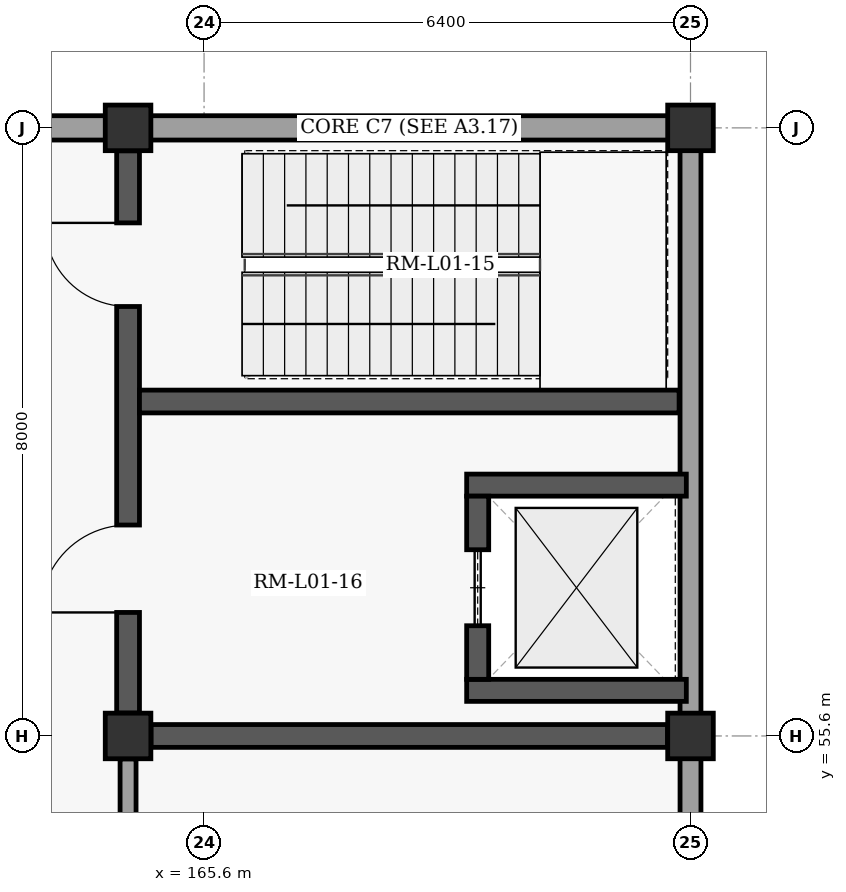
"""IFC4 building model, lengths in metres.
Left out: names, types, materials, properties, quantities, classifications, styles, units other than length and angle.
Written with IfcOpenShell. Run it as: python <this file> out.ifc"""

import sys

from ifc_helpers import new_model, si_unit, direction, frame, frame_2d, origin, origin_2d, place, context, subcontext, project, spatial, rectangle, extrude, element, fill, save


model = new_model("IFC4")
c1 = context("Model", 3, precision=1e-05, world=origin(), true_north=direction((0.0, 1.0)))
c2 = subcontext(c1, "Body", "Model", "MODEL_VIEW")
j1 = project(units=[si_unit("LENGTHUNIT", "METRE"), si_unit("PLANEANGLEUNIT", "RADIAN")], contexts=[c1])
p1 = place(None, origin())
s1 = spatial("IfcSite", under=j1, at=p1, CompositionType="ELEMENT")
p2 = place(p1, origin())
s2 = spatial("IfcBuilding", under=s1, at=p2, CompositionType="ELEMENT")
p3 = place(p2, frame((0.0, 0.0, 5.4)))
s3 = spatial("IfcBuildingStorey", under=s2, at=p3, CompositionType="ELEMENT", Elevation=5.4)
for number, where, z_axis, x_axis in (
    (1, (164.6, 55.6, 0.0), (0.0, 0.0, 1.0), (1.0, 0.0, 0.0)),
    (2, (164.6, 63.6, 0.0), (0.0, 0.0, 1.0), (1.0, 0.0, 0.0)),
    (3, (172.0, 55.6, 0.0), (0.0, 0.0, 1.0), (1.0, 0.0, 0.0)),
    (4, (172.0, 63.6, 0.0), (0.0, 0.0, 1.0), (1.0, 0.0, 0.0)),
):
    element("IfcColumn", number, at=place(p3, frame(where, z_axis=z_axis, x_axis=x_axis)), inside=s3, PredefinedType="COLUMN", context=c2, shape_type="SweptSolid", body=[
        extrude(rectangle(XDim=0.6, YDim=0.6, at=origin_2d()), origin(), (0.0, 0.0, 1.0), 4.8),
    ])
p4 = place(p3, frame((149.2, 63.6, 0.0), z_axis=(0.0, 0.0, 1.0), x_axis=(1.0, 0.0, 0.0)))
e5 = element("IfcWall", 5, at=p4, inside=s3, PredefinedType="SOLIDWALL", context=c2, shape_type="SweptSolid", body=[
    extrude(rectangle(XDim=22.8, YDim=0.32, at=frame_2d((11.4, 0.0))), origin(), (0.0, 0.0, 1.0), 3.67),
])
p5 = place(p4, frame((2.2, 0.0, 0.9)))
e6 = element("IfcOpeningElement", 6, at=p5, cuts=e5, PredefinedType="OPENING", context=c2, shape_type="SweptSolid", body=[
    extrude(rectangle(XDim=2.2, YDim=1.7, at=frame_2d((1.1, 0.85))), frame((0.0, 0.17, 0.0), z_axis=(0.0, -1.0, 0.0), x_axis=(1.0, 0.0, 0.0)), (0.0, 0.0, 1.0), 0.34),
])
p6 = place(p4, frame((7.6, 0.0, 0.0)))
e7 = element("IfcOpeningElement", 7, at=p6, cuts=e5, PredefinedType="OPENING", context=c2, shape_type="SweptSolid", body=[
    extrude(rectangle(XDim=1.4, YDim=2.25, at=frame_2d((0.7, 1.125))), frame((0.0, 0.17, 0.0), z_axis=(0.0, -1.0, 0.0), x_axis=(1.0, 0.0, 0.0)), (0.0, 0.0, 1.0), 0.34),
])
p7 = place(p3, frame((172.0, 63.6, 0.0), z_axis=(0.0, 0.0, 1.0), x_axis=(0.0, -1.0, 0.0)))
e8 = element("IfcWall", 8, at=p7, inside=s3, PredefinedType="SOLIDWALL", context=c2, shape_type="SweptSolid", body=[
    extrude(rectangle(XDim=56.0, YDim=0.275, at=frame_2d((28.0, 0.0))), origin(), (0.0, 0.0, 1.0), 3.67),
])
p8 = place(p7, frame((10.933, 0.0, 0.8)))
e9 = element("IfcOpeningElement", 9, at=p8, cuts=e8, PredefinedType="OPENING", context=c2, shape_type="SweptSolid", body=[
    extrude(rectangle(XDim=1.8, YDim=2.15, at=frame_2d((0.9, 1.075))), frame((0.0, 0.147, 0.0), z_axis=(0.0, -1.0, 0.0), x_axis=(1.0, 0.0, 0.0)), (0.0, 0.0, 1.0), 0.295),
])
p9 = place(p7, frame((19.667, 0.0, 0.8)))
e10 = element("IfcOpeningElement", 10, at=p9, cuts=e8, PredefinedType="OPENING", context=c2, shape_type="SweptSolid", body=[
    extrude(rectangle(XDim=1.9, YDim=2.2, at=frame_2d((0.95, 1.1))), frame((0.0, 0.147, 0.0), z_axis=(0.0, -1.0, 0.0), x_axis=(1.0, 0.0, 0.0)), (0.0, 0.0, 1.0), 0.295),
])
p10 = place(p7, frame((28.4, 0.0, 0.8)))
e11 = element("IfcOpeningElement", 11, at=p10, cuts=e8, PredefinedType="OPENING", context=c2, shape_type="SweptSolid", body=[
    extrude(rectangle(XDim=2.0, YDim=2.2, at=frame_2d((1.0, 1.1))), frame((0.0, 0.147, 0.0), z_axis=(0.0, -1.0, 0.0), x_axis=(1.0, 0.0, 0.0)), (0.0, 0.0, 1.0), 0.295),
])
p11 = place(p7, frame((37.133, 0.0, 0.8)))
e12 = element("IfcOpeningElement", 12, at=p11, cuts=e8, PredefinedType="OPENING", context=c2, shape_type="SweptSolid", body=[
    extrude(rectangle(XDim=2.1, YDim=2.2, at=frame_2d((1.05, 1.1))), frame((0.0, 0.147, 0.0), z_axis=(0.0, -1.0, 0.0), x_axis=(1.0, 0.0, 0.0)), (0.0, 0.0, 1.0), 0.295),
])
p12 = place(p7, frame((45.117, 0.0, 0.8)))
e13 = element("IfcOpeningElement", 13, at=p12, cuts=e8, PredefinedType="OPENING", context=c2, shape_type="SweptSolid", body=[
    extrude(rectangle(XDim=2.2, YDim=2.25, at=frame_2d((1.1, 1.125))), frame((0.0, 0.147, 0.0), z_axis=(0.0, -1.0, 0.0), x_axis=(1.0, 0.0, 0.0)), (0.0, 0.0, 1.0), 0.295),
])
p13 = place(p3, frame((164.902, 55.6, 0.0), z_axis=(0.0, 0.0, 1.0), x_axis=(1.0, 0.0, 0.0)))
e14 = element("IfcWall", 14, at=p13, inside=s3, PredefinedType="SHEAR", context=c2, shape_type="SweptSolid", body=[
    extrude(rectangle(XDim=6.796, YDim=0.3, at=frame_2d((3.398, 0.0))), origin(), (0.0, 0.0, 1.0), 4.52),
])
p14 = place(p3, frame((164.6, 55.902, 0.0), z_axis=(0.0, 0.0, 1.0), x_axis=(0.0, 1.0, 0.0)))
e15 = element("IfcWall", 15, at=p14, inside=s3, PredefinedType="SHEAR", context=c2, shape_type="SweptSolid", body=[
    extrude(rectangle(XDim=7.396, YDim=0.3, at=frame_2d((3.698, 0.0))), origin(), (0.0, 0.0, 1.0), 4.52),
])
p15 = place(p14, frame((5.348, 0.0, 0.0)))
e16 = element("IfcOpeningElement", 16, at=p15, cuts=e15, PredefinedType="OPENING", context=c2, shape_type="SweptSolid", body=[
    extrude(rectangle(XDim=1.1, YDim=2.15, at=frame_2d((0.55, 1.075))), frame((0.0, 0.16, 0.0), z_axis=(0.0, -1.0, 0.0), x_axis=(1.0, 0.0, 0.0)), (0.0, 0.0, 1.0), 0.32),
])
p16 = place(p14, frame((1.323, 0.0, 0.0)))
e17 = element("IfcOpeningElement", 17, at=p16, cuts=e15, PredefinedType="OPENING", context=c2, shape_type="SweptSolid", body=[
    extrude(rectangle(XDim=1.15, YDim=2.2, at=frame_2d((0.575, 1.1))), frame((0.0, 0.16, 0.0), z_axis=(0.0, -1.0, 0.0), x_axis=(1.0, 0.0, 0.0)), (0.0, 0.0, 1.0), 0.32),
])
p17 = place(p3, frame((164.75, 60.0, 0.0), z_axis=(0.0, 0.0, 1.0), x_axis=(1.0, 0.0, 0.0)))
e18 = element("IfcWall", 18, at=p17, inside=s3, PredefinedType="SHEAR", context=c2, shape_type="SweptSolid", body=[
    extrude(rectangle(XDim=7.1, YDim=0.3, at=frame_2d((3.55, 0.0))), origin(), (0.0, 0.0, 1.0), 4.52),
])
for number, where, z_axis, x_axis in (
    (19, (169.055, 56.2, 0.0), (0.0, 0.0, 1.0), (1.0, 0.0, 0.0)),
    (20, (169.055, 58.9, 0.0), (0.0, 0.0, 1.0), (1.0, 0.0, 0.0)),
):
    element("IfcWall", number, at=place(p3, frame(where, z_axis=z_axis, x_axis=x_axis)), inside=s3, PredefinedType="SHEAR", context=c2, shape_type="SweptSolid", body=[
        extrude(rectangle(XDim=2.89, YDim=0.29, at=frame_2d((1.445, 0.0))), origin(), (0.0, 0.0, 1.0), 4.52),
    ])
p18 = place(p3, frame((169.2, 56.345, 0.0), z_axis=(0.0, 0.0, 1.0), x_axis=(0.0, 1.0, 0.0)))
e21 = element("IfcWall", 21, at=p18, inside=s3, PredefinedType="SHEAR", context=c2, shape_type="SweptSolid", body=[
    extrude(rectangle(XDim=2.41, YDim=0.29, at=frame_2d((1.205, 0.0))), origin(), (0.0, 0.0, 1.0), 4.52),
])
p19 = place(p18, frame((0.705, 0.0, 0.0)))
e22 = element("IfcOpeningElement", 22, at=p19, cuts=e21, PredefinedType="OPENING", context=c2, shape_type="SweptSolid", body=[
    extrude(rectangle(XDim=1.0, YDim=2.15, at=frame_2d((0.5, 1.075))), frame((0.0, 0.155, 0.0), z_axis=(0.0, -1.0, 0.0), x_axis=(1.0, 0.0, 0.0)), (0.0, 0.0, 1.0), 0.31),
])
p20 = place(p3, frame((164.6, 55.298, 0.0), z_axis=(0.0, 0.0, 1.0), x_axis=(0.0, -1.0, 0.0)))
e23 = element("IfcWall", 23, at=p20, inside=s3, PredefinedType="PARTITIONING", context=c2, shape_type="SweptSolid", body=[
    extrude(rectangle(XDim=47.396, YDim=0.21, at=frame_2d((23.698, 0.0))), origin(), (0.0, 0.0, 1.0), 3.67),
])
p21 = place(p20, frame((24.18, 0.0, 0.0)))
e24 = element("IfcOpeningElement", 24, at=p21, cuts=e23, PredefinedType="OPENING", context=c2, shape_type="SweptSolid", body=[
    extrude(rectangle(XDim=1.55, YDim=2.25, at=frame_2d((0.775, 1.125))), frame((0.0, 0.115, 0.0), z_axis=(0.0, -1.0, 0.0), x_axis=(1.0, 0.0, 0.0)), (0.0, 0.0, 1.0), 0.23),
])
p22 = place(p20, frame((36.269, 0.0, 0.0)))
e25 = element("IfcOpeningElement", 25, at=p22, cuts=e23, PredefinedType="OPENING", context=c2, shape_type="SweptSolid", body=[
    extrude(rectangle(XDim=1.4, YDim=2.25, at=frame_2d((0.7, 1.125))), frame((0.0, 0.115, 0.0), z_axis=(0.0, -1.0, 0.0), x_axis=(1.0, 0.0, 0.0)), (0.0, 0.0, 1.0), 0.23),
])
p23 = place(p15, origin())
e26 = element("IfcDoor", 26, at=p23, inside=s3, OperationType="SINGLE_SWING_RIGHT", PredefinedType="DOOR", context=c2, shape_type="SweptSolid", body=[
    extrude(rectangle(XDim=1.1, YDim=2.15, at=frame_2d((0.55, 1.075))), frame((0.0, 0.025, 0.0), z_axis=(0.0, -1.0, 0.0), x_axis=(1.0, 0.0, 0.0)), (0.0, 0.0, 1.0), 0.05),
])
fill(e16, e26)
p24 = place(p16, origin())
e27 = element("IfcDoor", 27, at=p24, inside=s3, OperationType="SINGLE_SWING_LEFT", PredefinedType="DOOR", context=c2, shape_type="SweptSolid", body=[
    extrude(rectangle(XDim=1.15, YDim=2.2, at=frame_2d((0.575, 1.1))), frame((0.0, 0.025, 0.0), z_axis=(0.0, -1.0, 0.0), x_axis=(1.0, 0.0, 0.0)), (0.0, 0.0, 1.0), 0.05),
])
fill(e17, e27)
p25 = place(p19, origin())
e28 = element("IfcDoor", 28, at=p25, inside=s3, OperationType="SLIDING_TO_LEFT", PredefinedType="DOOR", context=c2, shape_type="SweptSolid", body=[
    extrude(rectangle(XDim=1.0, YDim=2.15, at=frame_2d((0.5, 1.075))), frame((0.0, 0.025, 0.0), z_axis=(0.0, -1.0, 0.0), x_axis=(1.0, 0.0, 0.0)), (0.0, 0.0, 1.0), 0.05),
])
fill(e22, e28)
save(model, sys.argv[1])
